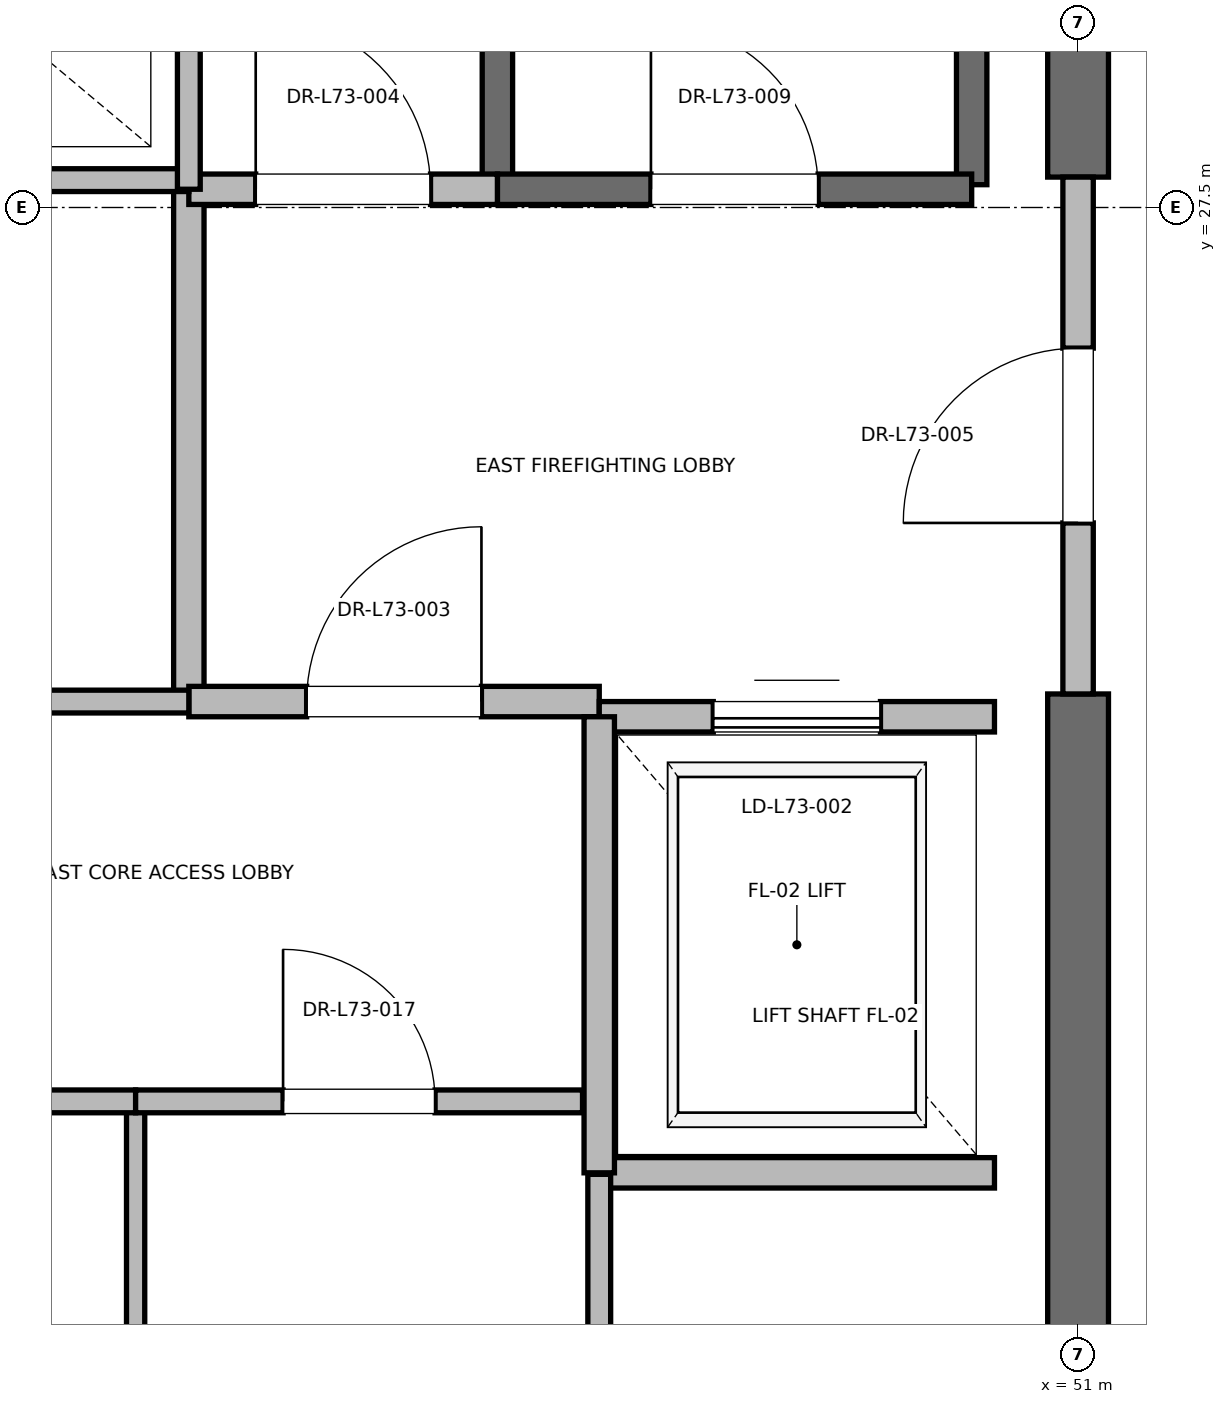
"""IFC4 building model, lengths in metres.
Left out: names, types, materials, properties, quantities, classifications, styles, units other than length and angle.
Written with IfcOpenShell. Run it as: python <this file> out.ifc"""

import sys

from ifc_helpers import new_model, si_unit, direction, frame, frame_2d, origin, place, context, subcontext, project, spatial, rectangle, extrude, element, fill, save


model = new_model("IFC4")
c1 = context("Model", 3, precision=1e-05, world=origin(), true_north=direction((0.0, 1.0)))
c2 = subcontext(c1, "Body", "Model", "MODEL_VIEW")
j1 = project(units=[si_unit("LENGTHUNIT", "METRE"), si_unit("PLANEANGLEUNIT", "RADIAN")], contexts=[c1])
p1 = place(None, origin())
s1 = spatial("IfcSite", under=j1, at=p1, CompositionType="ELEMENT")
p2 = place(p1, origin())
s2 = spatial("IfcBuilding", under=s1, at=p2, CompositionType="ELEMENT")
p3 = place(p2, frame((0.0, 0.0, 314.8)))
s3 = spatial("IfcBuildingStorey", under=s2, at=p3, CompositionType="ELEMENT", Elevation=314.8)
p4 = place(p3, frame((51.0, 18.5, 0.0), z_axis=(0.0, 0.0, 1.0), x_axis=(0.0, 1.0, 0.0)))
e1 = element("IfcWall", 1, at=p4, inside=s3, PredefinedType="SHEAR", context=c2, shape_type="SweptSolid", body=[
    extrude(rectangle(XDim=5.8, YDim=0.4, at=frame_2d((2.9, 0.0))), origin(), (0.0, 0.0, 1.0), 3.785),
])
p5 = place(p3, frame((51.0, 27.7, 0.0), z_axis=(0.0, 0.0, 1.0), x_axis=(0.0, 1.0, 0.0)))
e2 = element("IfcWall", 2, at=p5, inside=s3, PredefinedType="SHEAR", context=c2, shape_type="SweptSolid", body=[
    extrude(rectangle(XDim=8.8, YDim=0.4, at=frame_2d((4.4, 0.0))), origin(), (0.0, 0.0, 1.0), 3.785),
])
p6 = place(p3, frame((50.3, 27.65, 0.0), z_axis=(0.0, 0.0, 1.0), x_axis=(0.0, 1.0, 0.0)))
e3 = element("IfcWall", 3, at=p6, inside=s3, PredefinedType="SOLIDWALL", context=c2, shape_type="SweptSolid", body=[
    extrude(rectangle(XDim=8.15, YDim=0.2, at=frame_2d((4.075, 0.0))), origin(), (0.0, 0.0, 1.0), 3.785),
])
p7 = place(p3, frame((47.18, 27.62, 0.0), z_axis=(0.0, 0.0, 1.0), x_axis=(0.0, 1.0, 0.0)))
e4 = element("IfcWall", 4, at=p7, inside=s3, PredefinedType="SOLIDWALL", context=c2, shape_type="SweptSolid", body=[
    extrude(rectangle(XDim=8.18, YDim=0.2, at=frame_2d((4.09, 0.0))), origin(), (0.0, 0.0, 1.0), 3.785),
])
p8 = place(p3, frame((47.18, 27.62, 0.0), z_axis=(0.0, 0.0, 1.0), x_axis=(1.0, 0.0, 0.0)))
e5 = element("IfcWall", 5, at=p8, inside=s3, PredefinedType="SOLIDWALL", context=c2, shape_type="SweptSolid", body=[
    extrude(rectangle(XDim=3.12, YDim=0.2, at=frame_2d((1.56, 0.0))), origin(), (0.0, 0.0, 1.0), 3.785),
])
p9 = place(p8, frame((1.01, 0.0, 0.0)))
e6 = element("IfcOpeningElement", 6, at=p9, cuts=e5, PredefinedType="OPENING", context=c2, shape_type="SweptSolid", body=[
    extrude(rectangle(XDim=1.1, YDim=2.15, at=frame_2d((0.55, 1.075))), frame((0.0, 0.1, 0.0), z_axis=(0.0, -1.0, 0.0), x_axis=(1.0, 0.0, 0.0)), (0.0, 0.0, 1.0), 0.2),
])
p10 = place(p3, frame((45.15, 24.25, 0.0), z_axis=(0.0, 0.0, 1.0), x_axis=(0.0, 1.0, 0.0)))
e7 = element("IfcWall", 7, at=p10, inside=s3, PredefinedType="PARTITIONING", context=c2, shape_type="SweptSolid", body=[
    extrude(rectangle(XDim=3.37, YDim=0.2, at=frame_2d((1.685, 0.0))), origin(), (0.0, 0.0, 1.0), 3.785),
])
p11 = place(p3, frame((45.15, 24.25, 0.0), z_axis=(0.0, 0.0, 1.0), x_axis=(1.0, 0.0, 0.0)))
e8 = element("IfcWall", 8, at=p11, inside=s3, PredefinedType="PARTITIONING", context=c2, shape_type="SweptSolid", body=[
    extrude(rectangle(XDim=2.7, YDim=0.2, at=frame_2d((1.35, 0.0))), origin(), (0.0, 0.0, 1.0), 3.785),
])
p12 = place(p11, frame((0.775, 0.0, 0.0)))
e9 = element("IfcOpeningElement", 9, at=p12, cuts=e8, PredefinedType="OPENING", context=c2, shape_type="SweptSolid", body=[
    extrude(rectangle(XDim=1.15, YDim=2.2, at=frame_2d((0.575, 1.1))), frame((0.0, 0.1, 0.0), z_axis=(0.0, -1.0, 0.0), x_axis=(1.0, 0.0, 0.0)), (0.0, 0.0, 1.0), 0.2),
])
p13 = place(p3, frame((45.15, 27.62, 0.0), z_axis=(0.0, 0.0, 1.0), x_axis=(1.0, 0.0, 0.0)))
e10 = element("IfcWall", 10, at=p13, inside=s3, PredefinedType="PARTITIONING", context=c2, shape_type="SweptSolid", body=[
    extrude(rectangle(XDim=2.03, YDim=0.2, at=frame_2d((1.015, 0.0))), origin(), (0.0, 0.0, 1.0), 3.785),
])
p14 = place(p13, frame((0.44, 0.0, 0.0)))
e11 = element("IfcOpeningElement", 11, at=p14, cuts=e10, PredefinedType="OPENING", context=c2, shape_type="SweptSolid", body=[
    extrude(rectangle(XDim=1.15, YDim=2.2, at=frame_2d((0.575, 1.1))), frame((0.0, 0.1, 0.0), z_axis=(0.0, -1.0, 0.0), x_axis=(1.0, 0.0, 0.0)), (0.0, 0.0, 1.0), 0.2),
])
p15 = place(p3, frame((51.0, 24.3, 0.0), z_axis=(0.0, 0.0, 1.0), x_axis=(0.0, 1.0, 0.0)))
e12 = element("IfcWall", 12, at=p15, inside=s3, PredefinedType="PARTITIONING", context=c2, shape_type="SweptSolid", body=[
    extrude(rectangle(XDim=3.4, YDim=0.2, at=frame_2d((1.7, 0.0))), origin(), (0.0, 0.0, 1.0), 2.865),
])
p16 = place(p15, frame((1.125, 0.0, 0.0)))
e13 = element("IfcOpeningElement", 13, at=p16, cuts=e12, PredefinedType="OPENING", context=c2, shape_type="SweptSolid", body=[
    extrude(rectangle(XDim=1.15, YDim=2.2, at=frame_2d((0.575, 1.1))), frame((0.0, 0.1, 0.0), z_axis=(0.0, -1.0, 0.0), x_axis=(1.0, 0.0, 0.0)), (0.0, 0.0, 1.0), 0.2),
])
p17 = place(p3, frame((47.85, 21.15, 0.0), z_axis=(0.0, 0.0, 1.0), x_axis=(1.0, 0.0, 0.0)))
e14 = element("IfcWall", 14, at=p17, inside=s3, PredefinedType="SOLIDWALL", context=c2, shape_type="SweptSolid", body=[
    extrude(rectangle(XDim=2.6, YDim=0.2, at=frame_2d((1.3, 0.0))), origin(), (0.0, 0.0, 1.0), 3.785),
])
p18 = place(p3, frame((50.45, 24.15, 0.0), z_axis=(0.0, 0.0, 1.0), x_axis=(-1.0, 0.0, 0.0)))
e15 = element("IfcWall", 15, at=p18, inside=s3, PredefinedType="SOLIDWALL", context=c2, shape_type="SweptSolid", body=[
    extrude(rectangle(XDim=2.6, YDim=0.2, at=frame_2d((1.3, 0.0))), origin(), (0.0, 0.0, 1.0), 2.865),
])
p19 = place(p18, frame((0.75, 0.0, 0.0)))
e16 = element("IfcOpeningElement", 16, at=p19, cuts=e15, PredefinedType="OPENING", context=c2, shape_type="SweptSolid", body=[
    extrude(rectangle(XDim=1.1, YDim=2.2, at=frame_2d((0.55, 1.1))), frame((0.0, 0.1, 0.0), z_axis=(0.0, -1.0, 0.0), x_axis=(1.0, 0.0, 0.0)), (0.0, 0.0, 1.0), 0.2),
])
p20 = place(p3, frame((47.85, 24.15, 0.0), z_axis=(0.0, 0.0, 1.0), x_axis=(0.0, -1.0, 0.0)))
e17 = element("IfcWall", 17, at=p20, inside=s3, PredefinedType="SOLIDWALL", context=c2, shape_type="SweptSolid", body=[
    extrude(rectangle(XDim=3.0, YDim=0.2, at=frame_2d((1.5, 0.0))), origin(), (0.0, 0.0, 1.0), 3.785),
])
p21 = place(p3, frame((41.56, 27.68, 0.0), z_axis=(0.0, 0.0, 1.0), x_axis=(1.0, 0.0, 0.0)))
e18 = element("IfcWall", 18, at=p21, inside=s3, PredefinedType="PARTITIONING", context=c2, shape_type="SweptSolid", body=[
    extrude(rectangle(XDim=3.59, YDim=0.15, at=frame_2d((1.795, 0.0))), origin(), (0.0, 0.0, 1.0), 2.85),
])
p22 = place(p3, frame((47.85, 18.6, 0.0), z_axis=(0.0, 0.0, 1.0), x_axis=(0.0, 1.0, 0.0)))
e19 = element("IfcWall", 19, at=p22, inside=s3, PredefinedType="PARTITIONING", context=c2, shape_type="SweptSolid", body=[
    extrude(rectangle(XDim=2.54, YDim=0.15, at=frame_2d((1.27, 0.0))), origin(), (0.0, 0.0, 1.0), 2.85),
])
p23 = place(p3, frame((44.8, 18.6, 0.0), z_axis=(0.0, 0.0, 1.0), x_axis=(0.0, 1.0, 0.0)))
e20 = element("IfcWall", 20, at=p23, inside=s3, PredefinedType="PARTITIONING", context=c2, shape_type="SweptSolid", body=[
    extrude(rectangle(XDim=3.02, YDim=0.12, at=frame_2d((1.51, 0.0))), origin(), (0.0, 0.0, 1.0), 2.85),
])
p24 = place(p3, frame((41.76, 21.62, 0.0), z_axis=(0.0, 0.0, 1.0), x_axis=(1.0, 0.0, 0.0)))
e21 = element("IfcWall", 21, at=p24, inside=s3, PredefinedType="PARTITIONING", context=c2, shape_type="SweptSolid", body=[
    extrude(rectangle(XDim=3.04, YDim=0.15, at=frame_2d((1.52, 0.0))), origin(), (0.0, 0.0, 1.0), 2.85),
])
p25 = place(p24, frame((1.02, 0.0, 0.0)))
e22 = element("IfcOpeningElement", 22, at=p25, cuts=e21, PredefinedType="OPENING", context=c2, shape_type="SweptSolid", body=[
    extrude(rectangle(XDim=1.0, YDim=2.15, at=frame_2d((0.5, 1.075))), frame((0.0, 0.075, 0.0), z_axis=(0.0, -1.0, 0.0), x_axis=(1.0, 0.0, 0.0)), (0.0, 0.0, 1.0), 0.15),
])
p26 = place(p3, frame((44.8, 21.62, 0.0), z_axis=(0.0, 0.0, 1.0), x_axis=(1.0, 0.0, 0.0)))
e23 = element("IfcWall", 23, at=p26, inside=s3, PredefinedType="PARTITIONING", context=c2, shape_type="SweptSolid", body=[
    extrude(rectangle(XDim=2.94, YDim=0.15, at=frame_2d((1.47, 0.0))), origin(), (0.0, 0.0, 1.0), 2.85),
])
p27 = place(p26, frame((0.97, 0.0, 0.0)))
e24 = element("IfcOpeningElement", 24, at=p27, cuts=e23, PredefinedType="OPENING", context=c2, shape_type="SweptSolid", body=[
    extrude(rectangle(XDim=1.0, YDim=2.15, at=frame_2d((0.5, 1.075))), frame((0.0, 0.075, 0.0), z_axis=(0.0, -1.0, 0.0), x_axis=(1.0, 0.0, 0.0)), (0.0, 0.0, 1.0), 0.15),
])
p28 = place(p3, frame((41.76, 24.25, 0.0), z_axis=(0.0, 0.0, 1.0), x_axis=(1.0, 0.0, 0.0)))
e25 = element("IfcWall", 25, at=p28, inside=s3, PredefinedType="PARTITIONING", context=c2, shape_type="SweptSolid", body=[
    extrude(rectangle(XDim=3.39, YDim=0.15, at=frame_2d((1.695, 0.0))), origin(), (0.0, 0.0, 1.0), 2.85),
])
p29 = place(p28, frame((1.255, 0.0, 0.0)))
e26 = element("IfcOpeningElement", 26, at=p29, cuts=e25, PredefinedType="OPENING", context=c2, shape_type="SweptSolid", body=[
    extrude(rectangle(XDim=0.88, YDim=2.1, at=frame_2d((0.44, 1.05))), frame((0.0, 0.075, 0.0), z_axis=(0.0, -1.0, 0.0), x_axis=(1.0, 0.0, 0.0)), (0.0, 0.0, 1.0), 0.15),
])
p30 = place(p3, frame((45.15, 27.62, 0.0), z_axis=(0.0, 0.0, 1.0), x_axis=(0.0, 1.0, 0.0)))
e27 = element("IfcWall", 27, at=p30, inside=s3, PredefinedType="PARTITIONING", context=c2, shape_type="SweptSolid", body=[
    extrude(rectangle(XDim=3.1, YDim=0.15, at=frame_2d((1.55, 0.0))), origin(), (0.0, 0.0, 1.0), 2.85),
])
p31 = place(p9, origin())
e28 = element("IfcDoor", 28, at=p31, inside=s3, OperationType="SINGLE_SWING_LEFT", PredefinedType="DOOR", context=c2, shape_type="SweptSolid", body=[
    extrude(rectangle(XDim=1.1, YDim=2.15, at=frame_2d((0.55, 1.075))), frame((0.0, 0.025, 0.0), z_axis=(0.0, -1.0, 0.0), x_axis=(1.0, 0.0, 0.0)), (0.0, 0.0, 1.0), 0.05),
])
fill(e6, e28)
p32 = place(p12, origin())
e29 = element("IfcDoor", 29, at=p32, inside=s3, OperationType="SINGLE_SWING_RIGHT", PredefinedType="DOOR", context=c2, shape_type="SweptSolid", body=[
    extrude(rectangle(XDim=1.15, YDim=2.2, at=frame_2d((0.575, 1.1))), frame((0.0, 0.025, 0.0), z_axis=(0.0, -1.0, 0.0), x_axis=(1.0, 0.0, 0.0)), (0.0, 0.0, 1.0), 0.05),
])
fill(e9, e29)
p33 = place(p14, origin())
e30 = element("IfcDoor", 30, at=p33, inside=s3, OperationType="SINGLE_SWING_LEFT", PredefinedType="DOOR", context=c2, shape_type="SweptSolid", body=[
    extrude(rectangle(XDim=1.15, YDim=2.2, at=frame_2d((0.575, 1.1))), frame((0.0, 0.025, 0.0), z_axis=(0.0, -1.0, 0.0), x_axis=(1.0, 0.0, 0.0)), (0.0, 0.0, 1.0), 0.05),
])
fill(e11, e30)
p34 = place(p16, origin())
e31 = element("IfcDoor", 31, at=p34, inside=s3, OperationType="SINGLE_SWING_LEFT", PredefinedType="DOOR", context=c2, shape_type="SweptSolid", body=[
    extrude(rectangle(XDim=1.15, YDim=2.2, at=frame_2d((0.575, 1.1))), frame((0.0, 0.025, 0.0), z_axis=(0.0, -1.0, 0.0), x_axis=(1.0, 0.0, 0.0)), (0.0, 0.0, 1.0), 0.05),
])
fill(e13, e31)
p35 = place(p19, origin())
e32 = element("IfcDoor", 32, at=p35, inside=s3, OperationType="SLIDING_TO_RIGHT", PredefinedType="DOOR", context=c2, shape_type="SweptSolid", body=[
    extrude(rectangle(XDim=1.1, YDim=2.2, at=frame_2d((0.55, 1.1))), frame((0.0, 0.025, 0.0), z_axis=(0.0, -1.0, 0.0), x_axis=(1.0, 0.0, 0.0)), (0.0, 0.0, 1.0), 0.05),
])
fill(e16, e32)
p36 = place(p27, origin())
e33 = element("IfcDoor", 33, at=p36, inside=s3, OperationType="SINGLE_SWING_LEFT", PredefinedType="DOOR", context=c2, shape_type="SweptSolid", body=[
    extrude(rectangle(XDim=1.0, YDim=2.15, at=frame_2d((0.5, 1.075))), frame((0.0, 0.025, 0.0), z_axis=(0.0, -1.0, 0.0), x_axis=(1.0, 0.0, 0.0)), (0.0, 0.0, 1.0), 0.05),
])
fill(e24, e33)
save(model, sys.argv[1])
